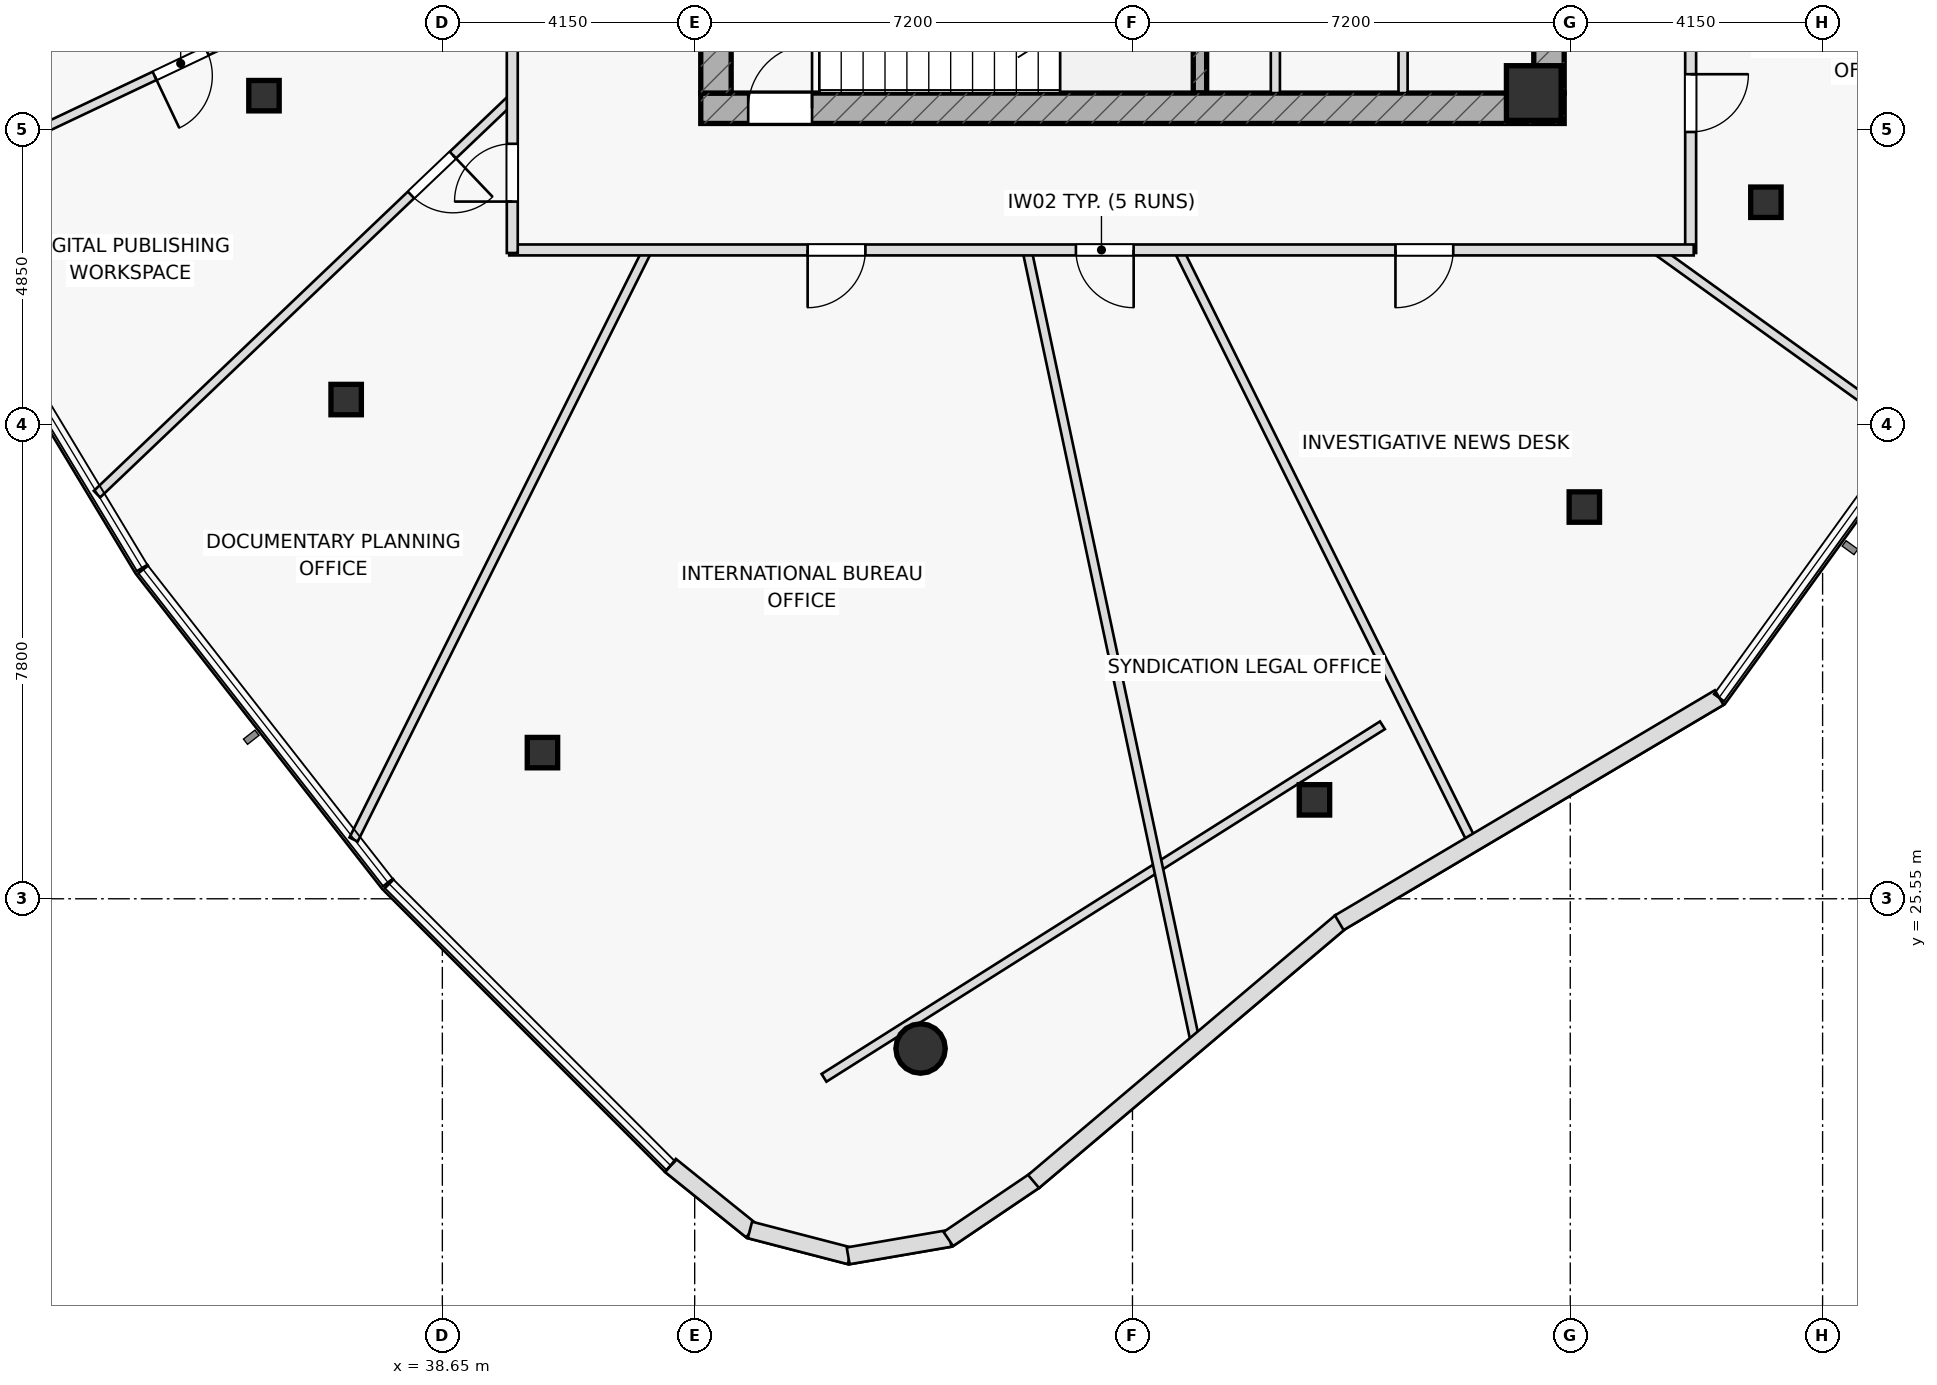
"""IFC4 building model, lengths in metres.
Left out: names, types, materials, properties, quantities, classifications, styles, units other than length and angle.
Written with IfcOpenShell. Run it as: python <this file> out.ifc"""

import sys

from ifc_helpers import new_model, si_unit, direction, frame, frame_2d, origin, origin_2d, place, context, subcontext, project, spatial, rectangle, hollow_rectangle, hollow_circle, extrude, element, fill, save


model = new_model("IFC4")
c1 = context("Model", 3, precision=1e-05, world=origin(), true_north=direction((0.0, 1.0)))
c2 = subcontext(c1, "Body", "Model", "MODEL_VIEW")
j1 = project(units=[si_unit("LENGTHUNIT", "METRE"), si_unit("PLANEANGLEUNIT", "RADIAN")], contexts=[c1])
p1 = place(None, origin())
s1 = spatial("IfcSite", under=j1, at=p1, CompositionType="ELEMENT")
p2 = place(p1, origin())
s2 = spatial("IfcBuilding", under=s1, at=p2, CompositionType="ELEMENT")
p3 = place(p2, frame((0.0, 0.0, 285.5)))
s3 = spatial("IfcBuildingStorey", under=s2, at=p3, CompositionType="ELEMENT", Elevation=285.5)
p4 = place(p3, frame((51.11, 38.8, 0.0), z_axis=(0.0, 0.0, 1.0), x_axis=(0.0, 1.0, 0.0)))
e1 = element("IfcWall", 1, at=p4, inside=s3, PredefinedType="SHEAR", context=c2, shape_type="SweptSolid", body=[
    extrude(rectangle(XDim=3.1, YDim=0.22, at=frame_2d((1.55, 0.0))), origin(), (0.0, 0.0, 1.0), 3.7),
])
p5 = place(p3, frame((42.9, 38.55, 0.0), z_axis=(0.0, 0.0, 1.0), x_axis=(1.0, 0.0, 0.0)))
e2 = element("IfcWall", 2, at=p5, inside=s3, PredefinedType="SHEAR", context=c2, shape_type="SweptSolid", body=[
    extrude(rectangle(XDim=14.2, YDim=0.5, at=frame_2d((7.1, 0.0))), origin(), (0.0, 0.0, 1.0), 3.7),
])
p6 = place(p5, frame((0.78, 0.0, 0.0)))
e3 = element("IfcOpeningElement", 3, at=p6, cuts=e2, PredefinedType="OPENING", context=c2, shape_type="SweptSolid", body=[
    extrude(rectangle(XDim=1.05, YDim=2.2, at=frame_2d((0.525, 1.1))), frame((0.0, 0.26, 0.0), z_axis=(0.0, -1.0, 0.0), x_axis=(1.0, 0.0, 0.0)), (0.0, 0.0, 1.0), 0.52),
])
p7 = place(p3, frame((43.15, 38.8, 0.0), z_axis=(0.0, 0.0, 1.0), x_axis=(0.0, 1.0, 0.0)))
e4 = element("IfcWall", 4, at=p7, inside=s3, PredefinedType="SHEAR", context=c2, shape_type="SweptSolid", body=[
    extrude(rectangle(XDim=12.4, YDim=0.5, at=frame_2d((6.2, 0.0))), origin(), (0.0, 0.0, 1.0), 3.7),
])
p8 = place(p3, frame((56.85, 38.8, 0.0), z_axis=(0.0, 0.0, 1.0), x_axis=(0.0, 1.0, 0.0)))
e5 = element("IfcWall", 5, at=p8, inside=s3, PredefinedType="SHEAR", context=c2, shape_type="SweptSolid", body=[
    extrude(rectangle(XDim=12.4, YDim=0.5, at=frame_2d((6.2, 0.0))), origin(), (0.0, 0.0, 1.0), 3.7),
])
p9 = place(p8, frame((3.85, 0.0, 0.0)))
e6 = element("IfcOpeningElement", 6, at=p9, cuts=e5, PredefinedType="OPENING", context=c2, shape_type="SweptSolid", body=[
    extrude(rectangle(XDim=1.5, YDim=2.2, at=frame_2d((0.75, 1.1))), frame((0.0, 0.26, 0.0), z_axis=(0.0, -1.0, 0.0), x_axis=(1.0, 0.0, 0.0)), (0.0, 0.0, 1.0), 0.52),
])
p10 = place(p3, frame((56.6, 38.8, 0.0), z_axis=(0.0, 0.0, 1.0), x_axis=(1.0, 0.0, 0.0)))
e7 = element("IfcColumn", 7, at=p10, inside=s3, PredefinedType="COLUMN", context=c2, shape_type="SweptSolid", body=[
    extrude(rectangle(XDim=0.9, YDim=0.9, at=origin_2d()), origin(), (0.0, 0.0, 1.0), 3.7),
])
for number, where, z_axis, x_axis in (
    (8, (35.717, 38.757, 0.0), (0.0, 0.0, 1.0), (1.0, 0.0, 0.0)),
    (9, (37.068, 33.76, 0.0), (0.0, 0.0, 1.0), (1.0, 0.0, 0.0)),
    (10, (40.296, 27.954, 0.0), (0.0, 0.0, 1.0), (1.0, 0.0, 0.0)),
):
    element("IfcColumn", number, at=place(p3, frame(where, z_axis=z_axis, x_axis=x_axis)), inside=s3, PredefinedType="COLUMN", context=c2, shape_type="SweptSolid", body=[
        extrude(hollow_rectangle(XDim=0.5, YDim=0.5, WallThickness=0.03, at=origin_2d()), origin(), (0.0, 0.0, 1.0), 3.7),
    ])
p11 = place(p3, frame((46.515, 23.087, 0.0), z_axis=(0.0, 0.0, 1.0), x_axis=(1.0, 0.0, 0.0)))
e11 = element("IfcColumn", 11, at=p11, inside=s3, PredefinedType="COLUMN", context=c2, shape_type="SweptSolid", body=[
    extrude(hollow_circle(Radius=0.406, WallThickness=0.036, at=origin_2d()), origin(), (0.0, 0.0, 1.0), 3.7),
])
for number, where, z_axis, x_axis in (
    (12, (52.993, 27.177, 0.0), (0.0, 0.0, 1.0), (1.0, 0.0, 0.0)),
    (13, (57.431, 31.992, 0.0), (0.0, 0.0, 1.0), (1.0, 0.0, 0.0)),
    (14, (60.417, 37.004, 0.0), (0.0, 0.0, 1.0), (1.0, 0.0, 0.0)),
):
    element("IfcColumn", number, at=place(p3, frame(where, z_axis=z_axis, x_axis=x_axis)), inside=s3, PredefinedType="COLUMN", context=c2, shape_type="SweptSolid", body=[
        extrude(hollow_rectangle(XDim=0.5, YDim=0.5, WallThickness=0.03, at=origin_2d()), origin(), (0.0, 0.0, 1.0), 3.7),
    ])
for number, where, z_axis, x_axis in (
    (15, (52.35, 38.8, 0.0), (0.0, 0.0, 1.0), (0.0, 1.0, 0.0)),
    (16, (54.45, 38.8, 0.0), (0.0, 0.0, 1.0), (0.0, 1.0, 0.0)),
):
    element("IfcWall", number, at=place(p3, frame(where, z_axis=z_axis, x_axis=x_axis)), inside=s3, PredefinedType="PARTITIONING", context=c2, shape_type="SweptSolid", body=[
        extrude(rectangle(XDim=3.1, YDim=0.15, at=frame_2d((1.55, 0.0))), origin(), (0.0, 0.0, 1.0), 3.7),
    ])
p12 = place(p3, frame((44.927, 22.605, 0.0), z_axis=(0.0, 0.0, 1.0), x_axis=(0.845624548895, 0.533778158326, 0.0)))
e17 = element("IfcWall", 17, at=p12, inside=s3, PredefinedType="PARTITIONING", context=c2, shape_type="SweptSolid", body=[
    extrude(rectangle(XDim=10.861, YDim=0.15, at=frame_2d((5.431, 0.0))), origin(), (0.0, 0.0, 1.0), 3.175),
])
p13 = place(p3, frame((37.08, 40.583, 0.0), z_axis=(0.0, 0.0, 1.0), x_axis=(-0.903622418397, -0.428329925372, 0.0)))
e18 = element("IfcWall", 18, at=p13, inside=s3, PredefinedType="PARTITIONING", context=c2, shape_type="SweptSolid", body=[
    extrude(rectangle(XDim=7.798, YDim=0.15, at=frame_2d((3.899, 0.0))), origin(), (0.0, 0.0, 1.0), 3.235),
])
p14 = place(p13, frame((2.55, 0.0, 0.0)))
e19 = element("IfcOpeningElement", 19, at=p14, cuts=e18, PredefinedType="OPENING", context=c2, shape_type="SweptSolid", body=[
    extrude(rectangle(XDim=0.95, YDim=2.05, at=frame_2d((0.475, 1.025))), frame((0.0, 0.085, 0.0), z_axis=(0.0, -1.0, 0.0), x_axis=(1.0, 0.0, 0.0)), (0.0, 0.0, 1.0), 0.17),
])
p15 = place(p3, frame((39.8, 38.712, 0.0), z_axis=(0.0, 0.0, 1.0), x_axis=(-0.723993287643, -0.68980701609, 0.0)))
e20 = element("IfcWall", 20, at=p15, inside=s3, PredefinedType="PARTITIONING", context=c2, shape_type="SweptSolid", body=[
    extrude(rectangle(XDim=9.434, YDim=0.15, at=frame_2d((4.717, 0.0))), origin(), (0.0, 0.0, 1.0), 3.235),
])
p16 = place(p15, frame((1.35, 0.0, 0.0)))
e21 = element("IfcOpeningElement", 21, at=p16, cuts=e20, PredefinedType="OPENING", context=c2, shape_type="SweptSolid", body=[
    extrude(rectangle(XDim=0.95, YDim=2.05, at=frame_2d((0.475, 1.025))), frame((0.0, 0.085, 0.0), z_axis=(0.0, -1.0, 0.0), x_axis=(1.0, 0.0, 0.0)), (0.0, 0.0, 1.0), 0.17),
])
p17 = place(p3, frame((42.023, 36.22, 0.0), z_axis=(0.0, 0.0, 1.0), x_axis=(-0.446122520894, -0.894971896962, 0.0)))
e22 = element("IfcWall", 22, at=p17, inside=s3, PredefinedType="PARTITIONING", context=c2, shape_type="SweptSolid", body=[
    extrude(rectangle(XDim=10.833, YDim=0.15, at=frame_2d((5.417, 0.0))), origin(), (0.0, 0.0, 1.0), 3.235),
])
p18 = place(p3, frame((48.265, 36.22, 0.0), z_axis=(0.0, 0.0, 1.0), x_axis=(0.207798682816, -0.978171614503, 0.0)))
e23 = element("IfcWall", 23, at=p18, inside=s3, PredefinedType="PARTITIONING", context=c2, shape_type="SweptSolid", body=[
    extrude(rectangle(XDim=13.367, YDim=0.15, at=frame_2d((6.683, 0.0))), origin(), (0.0, 0.0, 1.0), 3.235),
])
p19 = place(p3, frame((50.757, 36.22, 0.0), z_axis=(0.0, 0.0, 1.0), x_axis=(0.444489566035, -0.895784028483, 0.0)))
e24 = element("IfcWall", 24, at=p19, inside=s3, PredefinedType="PARTITIONING", context=c2, shape_type="SweptSolid", body=[
    extrude(rectangle(XDim=10.907, YDim=0.15, at=frame_2d((5.453, 0.0))), origin(), (0.0, 0.0, 1.0), 3.175),
])
p20 = place(p3, frame((58.615, 36.22, 0.0), z_axis=(0.0, 0.0, 1.0), x_axis=(0.812006963526, -0.583647745806, 0.0)))
e25 = element("IfcWall", 25, at=p20, inside=s3, PredefinedType="PARTITIONING", context=c2, shape_type="SweptSolid", body=[
    extrude(rectangle(XDim=5.161, YDim=0.15, at=frame_2d((2.58, 0.0))), origin(), (0.0, 0.0, 1.0), 3.235),
])
p21 = place(p3, frame((59.18, 41.1, 0.0), z_axis=(0.0, 0.0, 1.0), x_axis=(0.0, -1.0, 0.0)))
e26 = element("IfcWall", 26, at=p21, inside=s3, PredefinedType="PARTITIONING", context=c2, shape_type="SweptSolid", body=[
    extrude(rectangle(XDim=4.93, YDim=0.18, at=frame_2d((2.465, 0.0))), origin(), (0.0, 0.0, 1.0), 3.435),
])
p22 = place(p21, frame((1.99, 0.0, 0.0)))
e27 = element("IfcOpeningElement", 27, at=p22, cuts=e26, PredefinedType="OPENING", context=c2, shape_type="SweptSolid", body=[
    extrude(rectangle(XDim=0.95, YDim=2.05, at=frame_2d((0.475, 1.025))), frame((0.0, 0.1, 0.0), z_axis=(0.0, -1.0, 0.0), x_axis=(1.0, 0.0, 0.0)), (0.0, 0.0, 1.0), 0.2),
])
p23 = place(p3, frame((59.23, 36.22, 0.0), z_axis=(0.0, 0.0, 1.0), x_axis=(-1.0, 0.0, 0.0)))
e28 = element("IfcWall", 28, at=p23, inside=s3, PredefinedType="PARTITIONING", context=c2, shape_type="SweptSolid", body=[
    extrude(rectangle(XDim=19.48, YDim=0.18, at=frame_2d((9.74, 0.0))), origin(), (0.0, 0.0, 1.0), 3.175),
])
p24 = place(p23, frame((3.955, 0.0, 0.0)))
e29 = element("IfcOpeningElement", 29, at=p24, cuts=e28, PredefinedType="OPENING", context=c2, shape_type="SweptSolid", body=[
    extrude(rectangle(XDim=0.95, YDim=2.05, at=frame_2d((0.475, 1.025))), frame((0.0, 0.1, 0.0), z_axis=(0.0, -1.0, 0.0), x_axis=(1.0, 0.0, 0.0)), (0.0, 0.0, 1.0), 0.2),
])
p25 = place(p23, frame((9.21, 0.0, 0.0)))
e30 = element("IfcOpeningElement", 30, at=p25, cuts=e28, PredefinedType="OPENING", context=c2, shape_type="SweptSolid", body=[
    extrude(rectangle(XDim=0.95, YDim=2.05, at=frame_2d((0.475, 1.025))), frame((0.0, 0.1, 0.0), z_axis=(0.0, -1.0, 0.0), x_axis=(1.0, 0.0, 0.0)), (0.0, 0.0, 1.0), 0.2),
])
p26 = place(p23, frame((13.622, 0.0, 0.0)))
e31 = element("IfcOpeningElement", 31, at=p26, cuts=e28, PredefinedType="OPENING", context=c2, shape_type="SweptSolid", body=[
    extrude(rectangle(XDim=0.95, YDim=2.05, at=frame_2d((0.475, 1.025))), frame((0.0, 0.1, 0.0), z_axis=(0.0, -1.0, 0.0), x_axis=(1.0, 0.0, 0.0)), (0.0, 0.0, 1.0), 0.2),
])
p27 = place(p3, frame((39.8, 36.17, 0.0), z_axis=(0.0, 0.0, 1.0), x_axis=(0.0, 1.0, 0.0)))
e32 = element("IfcWall", 32, at=p27, inside=s3, PredefinedType="PARTITIONING", context=c2, shape_type="SweptSolid", body=[
    extrude(rectangle(XDim=4.08, YDim=0.18, at=frame_2d((2.04, 0.0))), origin(), (0.0, 0.0, 1.0), 3.435),
])
p28 = place(p27, frame((0.845, 0.0, 0.0)))
e33 = element("IfcOpeningElement", 33, at=p28, cuts=e32, PredefinedType="OPENING", context=c2, shape_type="SweptSolid", body=[
    extrude(rectangle(XDim=0.95, YDim=2.05, at=frame_2d((0.475, 1.025))), frame((0.0, 0.1, 0.0), z_axis=(0.0, -1.0, 0.0), x_axis=(1.0, 0.0, 0.0)), (0.0, 0.0, 1.0), 0.2),
])
p29 = place(p3, frame((42.403, 21.163, 0.0), z_axis=(0.0, 0.0, 1.0), x_axis=(0.778817818062, -0.627250194316, 0.0)))
e34 = element("IfcWall", 34, at=p29, inside=s3, PredefinedType="STANDARD", context=c2, shape_type="SweptSolid", body=[
    extrude(rectangle(XDim=1.711, YDim=0.28, at=frame_2d((0.855, 0.0))), origin(), (0.0, 0.0, 1.0), 3.7),
])
p30 = place(p3, frame((43.709, 20.104, 0.0), z_axis=(0.0, 0.0, 1.0), x_axis=(0.967939985715, -0.251181575865, 0.0)))
e35 = element("IfcWall", 35, at=p30, inside=s3, PredefinedType="STANDARD", context=c2, shape_type="SweptSolid", body=[
    extrude(rectangle(XDim=1.699, YDim=0.28, at=frame_2d((0.85, 0.0))), origin(), (0.0, 0.0, 1.0), 3.7),
])
p31 = place(p3, frame((45.324, 19.678, 0.0), z_axis=(0.0, 0.0, 1.0), x_axis=(0.985546267007, 0.169406480362, 0.0)))
e36 = element("IfcWall", 36, at=p31, inside=s3, PredefinedType="STANDARD", context=c2, shape_type="SweptSolid", body=[
    extrude(rectangle(XDim=1.699, YDim=0.28, at=frame_2d((0.85, 0.0))), origin(), (0.0, 0.0, 1.0), 3.7),
])
p32 = place(p3, frame((46.971, 19.955, 0.0), z_axis=(0.0, 0.0, 1.0), x_axis=(0.828587190747, 0.559860042627, 0.0)))
e37 = element("IfcWall", 37, at=p32, inside=s3, PredefinedType="STANDARD", context=c2, shape_type="SweptSolid", body=[
    extrude(rectangle(XDim=1.722, YDim=0.28, at=frame_2d((0.861, 0.0))), origin(), (0.0, 0.0, 1.0), 3.7),
])
p33 = place(p3, frame((48.374, 20.901, 0.0), z_axis=(0.0, 0.0, 1.0), x_axis=(0.763527637765, 0.645775151558, 0.0)))
e38 = element("IfcWall", 38, at=p33, inside=s3, PredefinedType="STANDARD", context=c2, shape_type="SweptSolid", body=[
    extrude(rectangle(XDim=6.616, YDim=0.28, at=frame_2d((3.308, 0.0))), origin(), (0.0, 0.0, 1.0), 3.7),
])
p34 = place(p3, frame((53.401, 25.156, 0.0), z_axis=(0.0, 0.0, 1.0), x_axis=(0.860282797966, 0.509817131453, 0.0)))
e39 = element("IfcWall", 39, at=p34, inside=s3, PredefinedType="STANDARD", context=c2, shape_type="SweptSolid", body=[
    extrude(rectangle(XDim=7.264, YDim=0.28, at=frame_2d((3.632, 0.0))), origin(), (0.0, 0.0, 1.0), 3.7),
])
p35 = place(p6, origin())
e40 = element("IfcDoor", 40, at=p35, inside=s3, OperationType="SINGLE_SWING_RIGHT", PredefinedType="DOOR", context=c2, shape_type="SweptSolid", body=[
    extrude(rectangle(XDim=1.05, YDim=2.2, at=frame_2d((0.525, 1.1))), frame((0.0, 0.025, 0.0), z_axis=(0.0, -1.0, 0.0), x_axis=(1.0, 0.0, 0.0)), (0.0, 0.0, 1.0), 0.05),
])
fill(e3, e40)
p36 = place(p14, origin())
e41 = element("IfcDoor", 41, at=p36, inside=s3, OperationType="SINGLE_SWING_RIGHT", PredefinedType="DOOR", context=c2, shape_type="SweptSolid", body=[
    extrude(rectangle(XDim=0.95, YDim=2.05, at=frame_2d((0.475, 1.025))), frame((0.0, 0.025, 0.0), z_axis=(0.0, -1.0, 0.0), x_axis=(1.0, 0.0, 0.0)), (0.0, 0.0, 1.0), 0.05),
])
fill(e19, e41)
p37 = place(p16, origin())
e42 = element("IfcDoor", 42, at=p37, inside=s3, OperationType="SINGLE_SWING_LEFT", PredefinedType="DOOR", context=c2, shape_type="SweptSolid", body=[
    extrude(rectangle(XDim=0.95, YDim=2.05, at=frame_2d((0.475, 1.025))), frame((0.0, 0.025, 0.0), z_axis=(0.0, -1.0, 0.0), x_axis=(1.0, 0.0, 0.0)), (0.0, 0.0, 1.0), 0.05),
])
fill(e21, e42)
p38 = place(p22, origin())
e43 = element("IfcDoor", 43, at=p38, inside=s3, OperationType="SINGLE_SWING_LEFT", PredefinedType="DOOR", context=c2, shape_type="SweptSolid", body=[
    extrude(rectangle(XDim=0.95, YDim=2.05, at=frame_2d((0.475, 1.025))), frame((0.0, 0.025, 0.0), z_axis=(0.0, -1.0, 0.0), x_axis=(1.0, 0.0, 0.0)), (0.0, 0.0, 1.0), 0.05),
])
fill(e27, e43)
p39 = place(p24, origin())
e44 = element("IfcDoor", 44, at=p39, inside=s3, OperationType="SINGLE_SWING_RIGHT", PredefinedType="DOOR", context=c2, shape_type="SweptSolid", body=[
    extrude(rectangle(XDim=0.95, YDim=2.05, at=frame_2d((0.475, 1.025))), frame((0.0, 0.025, 0.0), z_axis=(0.0, -1.0, 0.0), x_axis=(1.0, 0.0, 0.0)), (0.0, 0.0, 1.0), 0.05),
])
fill(e29, e44)
p40 = place(p25, origin())
e45 = element("IfcDoor", 45, at=p40, inside=s3, OperationType="SINGLE_SWING_LEFT", PredefinedType="DOOR", context=c2, shape_type="SweptSolid", body=[
    extrude(rectangle(XDim=0.95, YDim=2.05, at=frame_2d((0.475, 1.025))), frame((0.0, 0.025, 0.0), z_axis=(0.0, -1.0, 0.0), x_axis=(1.0, 0.0, 0.0)), (0.0, 0.0, 1.0), 0.05),
])
fill(e30, e45)
p41 = place(p26, origin())
e46 = element("IfcDoor", 46, at=p41, inside=s3, OperationType="SINGLE_SWING_RIGHT", PredefinedType="DOOR", context=c2, shape_type="SweptSolid", body=[
    extrude(rectangle(XDim=0.95, YDim=2.05, at=frame_2d((0.475, 1.025))), frame((0.0, 0.025, 0.0), z_axis=(0.0, -1.0, 0.0), x_axis=(1.0, 0.0, 0.0)), (0.0, 0.0, 1.0), 0.05),
])
fill(e31, e46)
p42 = place(p28, origin())
e47 = element("IfcDoor", 47, at=p42, inside=s3, OperationType="SINGLE_SWING_LEFT", PredefinedType="DOOR", context=c2, shape_type="SweptSolid", body=[
    extrude(rectangle(XDim=0.95, YDim=2.05, at=frame_2d((0.475, 1.025))), frame((0.0, 0.025, 0.0), z_axis=(0.0, -1.0, 0.0), x_axis=(1.0, 0.0, 0.0)), (0.0, 0.0, 1.0), 0.05),
])
fill(e33, e47)
save(model, sys.argv[1])
